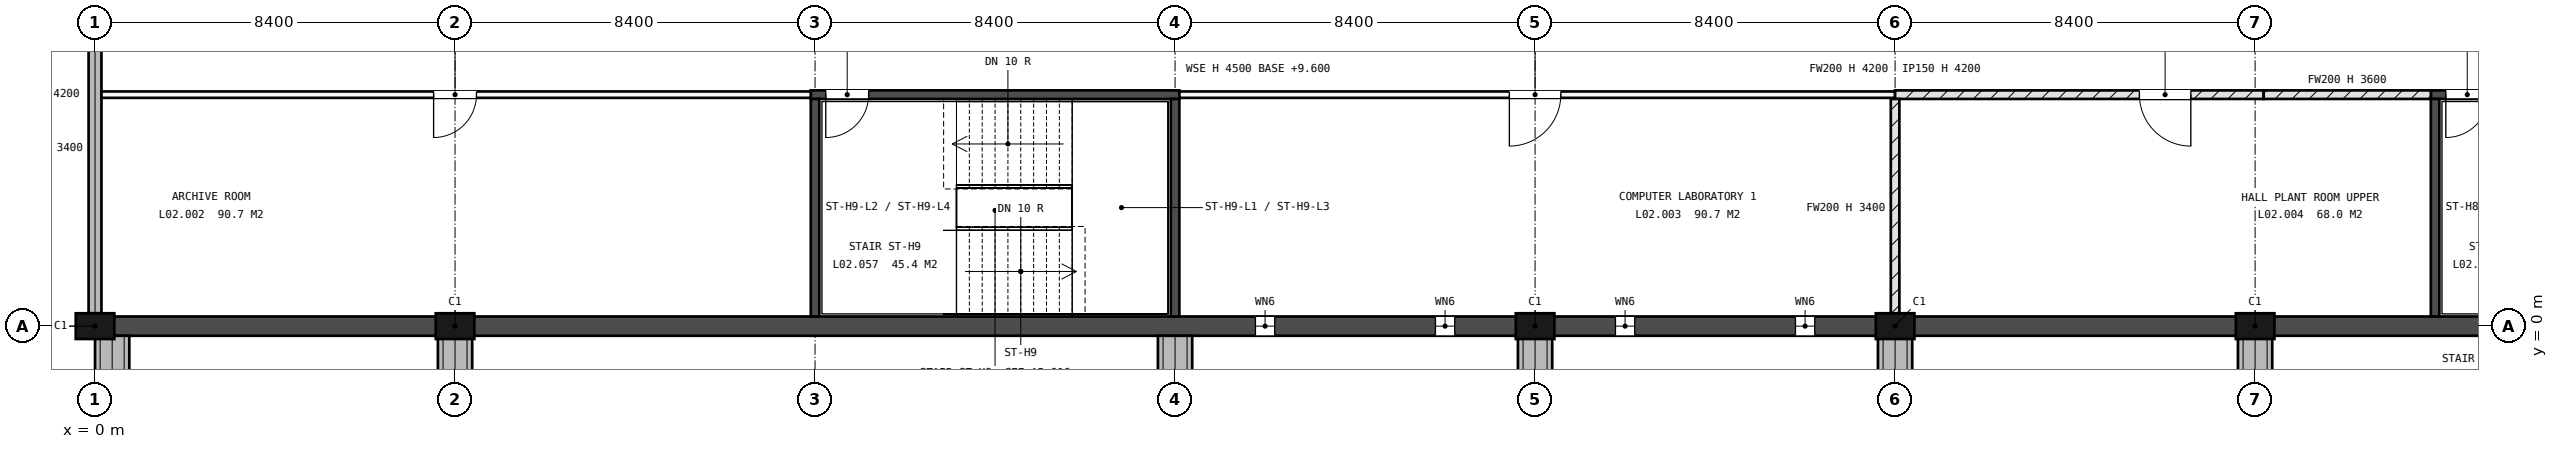
"""IFC4 building model, lengths in metres.
Left out: names, types, materials, properties, quantities, classifications, styles, units other than length and angle.
Written with IfcOpenShell. Run it as: python <this file> out.ifc"""

import sys

from ifc_helpers import new_model, si_unit, direction, frame, frame_2d, origin, origin_2d, place, context, subcontext, project, spatial, rectangle, extrude, element, fill, save


model = new_model("IFC4")
c1 = context("Model", 3, precision=1e-05, world=origin(), true_north=direction((0.0, 1.0)))
c2 = subcontext(c1, "Body", "Model", "MODEL_VIEW")
j1 = project(units=[si_unit("LENGTHUNIT", "METRE"), si_unit("PLANEANGLEUNIT", "RADIAN")], contexts=[c1])
p1 = place(None, origin())
s1 = spatial("IfcSite", under=j1, at=p1, CompositionType="ELEMENT")
p2 = place(p1, origin())
s2 = spatial("IfcBuilding", under=s1, at=p2, CompositionType="ELEMENT")
p3 = place(p2, frame((0.0, 0.0, 9.9)))
s3 = spatial("IfcBuildingStorey", under=s2, at=p3, CompositionType="ELEMENT", Elevation=9.9)
for number, where, z_axis, x_axis in (
    (1, (0.0, 0.0, -0.25), (0.0, 0.0, 1.0), (1.0, 0.0, 0.0)),
    (2, (8.4, 0.0, -0.25), (0.0, 0.0, 1.0), (1.0, 0.0, 0.0)),
    (3, (33.6, 0.0, -0.25), (0.0, 0.0, 1.0), (1.0, 0.0, 0.0)),
    (4, (42.0, 0.0, -0.25), (0.0, 0.0, 1.0), (1.0, 0.0, 0.0)),
    (5, (50.4, 0.0, -0.25), (0.0, 0.0, 1.0), (1.0, 0.0, 0.0)),
):
    element("IfcColumn", number, at=place(p3, frame(where, z_axis=z_axis, x_axis=x_axis)), inside=s3, PredefinedType="PILASTER", context=c2, shape_type="SweptSolid", body=[
        extrude(rectangle(XDim=0.9, YDim=0.6, at=origin_2d()), origin(), (0.0, 0.0, 1.0), 4.45),
    ])
p4 = place(p3, frame((0.0, 0.0, -0.25), z_axis=(0.0, 0.0, 1.0), x_axis=(1.0, 0.0, 0.0)))
e6 = element("IfcWall", 6, at=p4, inside=s3, PredefinedType="SOLIDWALL", context=c2, shape_type="SweptSolid", body=[
    extrude(rectangle(XDim=168.0, YDim=0.45, at=frame_2d((84.0, 0.0))), origin(), (0.0, 0.0, 1.0), 4.45),
])
p5 = place(p4, frame((27.075, 0.0, 1.45)))
e7 = element("IfcOpeningElement", 7, at=p5, cuts=e6, PredefinedType="OPENING", context=c2, shape_type="SweptSolid", body=[
    extrude(rectangle(XDim=0.45, YDim=2.4, at=frame_2d((0.225, 1.2))), frame((0.0, 0.235, 0.0), z_axis=(0.0, -1.0, 0.0), x_axis=(1.0, 0.0, 0.0)), (0.0, 0.0, 1.0), 0.47),
])
p6 = place(p4, frame((31.275, 0.0, 1.45)))
e8 = element("IfcOpeningElement", 8, at=p6, cuts=e6, PredefinedType="OPENING", context=c2, shape_type="SweptSolid", body=[
    extrude(rectangle(XDim=0.45, YDim=2.4, at=frame_2d((0.225, 1.2))), frame((0.0, 0.235, 0.0), z_axis=(0.0, -1.0, 0.0), x_axis=(1.0, 0.0, 0.0)), (0.0, 0.0, 1.0), 0.47),
])
p7 = place(p4, frame((35.475, 0.0, 1.45)))
e9 = element("IfcOpeningElement", 9, at=p7, cuts=e6, PredefinedType="OPENING", context=c2, shape_type="SweptSolid", body=[
    extrude(rectangle(XDim=0.45, YDim=2.4, at=frame_2d((0.225, 1.2))), frame((0.0, 0.235, 0.0), z_axis=(0.0, -1.0, 0.0), x_axis=(1.0, 0.0, 0.0)), (0.0, 0.0, 1.0), 0.47),
])
p8 = place(p4, frame((39.675, 0.0, 1.45)))
e10 = element("IfcOpeningElement", 10, at=p8, cuts=e6, PredefinedType="OPENING", context=c2, shape_type="SweptSolid", body=[
    extrude(rectangle(XDim=0.45, YDim=2.4, at=frame_2d((0.225, 1.2))), frame((0.0, 0.235, 0.0), z_axis=(0.0, -1.0, 0.0), x_axis=(1.0, 0.0, 0.0)), (0.0, 0.0, 1.0), 0.47),
])
p9 = place(p4, frame((94.275, 0.0, 1.45)))
e11 = element("IfcOpeningElement", 11, at=p9, cuts=e6, PredefinedType="OPENING", context=c2, shape_type="SweptSolid", body=[
    extrude(rectangle(XDim=0.45, YDim=2.4, at=frame_2d((0.225, 1.2))), frame((0.0, 0.235, 0.0), z_axis=(0.0, -1.0, 0.0), x_axis=(1.0, 0.0, 0.0)), (0.0, 0.0, 1.0), 0.47),
])
p10 = place(p4, frame((98.475, 0.0, 1.45)))
e12 = element("IfcOpeningElement", 12, at=p10, cuts=e6, PredefinedType="OPENING", context=c2, shape_type="SweptSolid", body=[
    extrude(rectangle(XDim=0.45, YDim=2.4, at=frame_2d((0.225, 1.2))), frame((0.0, 0.235, 0.0), z_axis=(0.0, -1.0, 0.0), x_axis=(1.0, 0.0, 0.0)), (0.0, 0.0, 1.0), 0.47),
])
p11 = place(p4, frame((102.675, 0.0, 1.45)))
e13 = element("IfcOpeningElement", 13, at=p11, cuts=e6, PredefinedType="OPENING", context=c2, shape_type="SweptSolid", body=[
    extrude(rectangle(XDim=0.45, YDim=2.4, at=frame_2d((0.225, 1.2))), frame((0.0, 0.235, 0.0), z_axis=(0.0, -1.0, 0.0), x_axis=(1.0, 0.0, 0.0)), (0.0, 0.0, 1.0), 0.47),
])
p12 = place(p4, frame((106.875, 0.0, 1.45)))
e14 = element("IfcOpeningElement", 14, at=p12, cuts=e6, PredefinedType="OPENING", context=c2, shape_type="SweptSolid", body=[
    extrude(rectangle(XDim=0.45, YDim=2.4, at=frame_2d((0.225, 1.2))), frame((0.0, 0.235, 0.0), z_axis=(0.0, -1.0, 0.0), x_axis=(1.0, 0.0, 0.0)), (0.0, 0.0, 1.0), 0.47),
])
p13 = place(p4, frame((111.075, 0.0, 1.45)))
e15 = element("IfcOpeningElement", 15, at=p13, cuts=e6, PredefinedType="OPENING", context=c2, shape_type="SweptSolid", body=[
    extrude(rectangle(XDim=0.45, YDim=2.4, at=frame_2d((0.225, 1.2))), frame((0.0, 0.235, 0.0), z_axis=(0.0, -1.0, 0.0), x_axis=(1.0, 0.0, 0.0)), (0.0, 0.0, 1.0), 0.47),
])
p14 = place(p4, frame((115.275, 0.0, 1.45)))
e16 = element("IfcOpeningElement", 16, at=p14, cuts=e6, PredefinedType="OPENING", context=c2, shape_type="SweptSolid", body=[
    extrude(rectangle(XDim=0.45, YDim=2.4, at=frame_2d((0.225, 1.2))), frame((0.0, 0.235, 0.0), z_axis=(0.0, -1.0, 0.0), x_axis=(1.0, 0.0, 0.0)), (0.0, 0.0, 1.0), 0.47),
])
p15 = place(p4, frame((127.875, 0.0, 1.45)))
e17 = element("IfcOpeningElement", 17, at=p15, cuts=e6, PredefinedType="OPENING", context=c2, shape_type="SweptSolid", body=[
    extrude(rectangle(XDim=0.45, YDim=2.4, at=frame_2d((0.225, 1.2))), frame((0.0, 0.235, 0.0), z_axis=(0.0, -1.0, 0.0), x_axis=(1.0, 0.0, 0.0)), (0.0, 0.0, 1.0), 0.47),
])
p16 = place(p4, frame((132.075, 0.0, 1.45)))
e18 = element("IfcOpeningElement", 18, at=p16, cuts=e6, PredefinedType="OPENING", context=c2, shape_type="SweptSolid", body=[
    extrude(rectangle(XDim=0.45, YDim=2.4, at=frame_2d((0.225, 1.2))), frame((0.0, 0.235, 0.0), z_axis=(0.0, -1.0, 0.0), x_axis=(1.0, 0.0, 0.0)), (0.0, 0.0, 1.0), 0.47),
])
p17 = place(p4, frame((136.275, 0.0, 1.45)))
e19 = element("IfcOpeningElement", 19, at=p17, cuts=e6, PredefinedType="OPENING", context=c2, shape_type="SweptSolid", body=[
    extrude(rectangle(XDim=0.45, YDim=2.4, at=frame_2d((0.225, 1.2))), frame((0.0, 0.235, 0.0), z_axis=(0.0, -1.0, 0.0), x_axis=(1.0, 0.0, 0.0)), (0.0, 0.0, 1.0), 0.47),
])
p18 = place(p4, frame((140.475, 0.0, 1.45)))
e20 = element("IfcOpeningElement", 20, at=p18, cuts=e6, PredefinedType="OPENING", context=c2, shape_type="SweptSolid", body=[
    extrude(rectangle(XDim=0.45, YDim=2.4, at=frame_2d((0.225, 1.2))), frame((0.0, 0.235, 0.0), z_axis=(0.0, -1.0, 0.0), x_axis=(1.0, 0.0, 0.0)), (0.0, 0.0, 1.0), 0.47),
])
p19 = place(p4, frame((144.675, 0.0, 1.45)))
e21 = element("IfcOpeningElement", 21, at=p19, cuts=e6, PredefinedType="OPENING", context=c2, shape_type="SweptSolid", body=[
    extrude(rectangle(XDim=0.45, YDim=2.4, at=frame_2d((0.225, 1.2))), frame((0.0, 0.235, 0.0), z_axis=(0.0, -1.0, 0.0), x_axis=(1.0, 0.0, 0.0)), (0.0, 0.0, 1.0), 0.47),
])
p20 = place(p4, frame((148.875, 0.0, 1.45)))
e22 = element("IfcOpeningElement", 22, at=p20, cuts=e6, PredefinedType="OPENING", context=c2, shape_type="SweptSolid", body=[
    extrude(rectangle(XDim=0.45, YDim=2.4, at=frame_2d((0.225, 1.2))), frame((0.0, 0.235, 0.0), z_axis=(0.0, -1.0, 0.0), x_axis=(1.0, 0.0, 0.0)), (0.0, 0.0, 1.0), 0.47),
])
p21 = place(p4, frame((153.075, 0.0, 1.45)))
e23 = element("IfcOpeningElement", 23, at=p21, cuts=e6, PredefinedType="OPENING", context=c2, shape_type="SweptSolid", body=[
    extrude(rectangle(XDim=0.45, YDim=2.4, at=frame_2d((0.225, 1.2))), frame((0.0, 0.235, 0.0), z_axis=(0.0, -1.0, 0.0), x_axis=(1.0, 0.0, 0.0)), (0.0, 0.0, 1.0), 0.47),
])
p22 = place(p4, frame((157.275, 0.0, 1.45)))
e24 = element("IfcOpeningElement", 24, at=p22, cuts=e6, PredefinedType="OPENING", context=c2, shape_type="SweptSolid", body=[
    extrude(rectangle(XDim=0.45, YDim=2.4, at=frame_2d((0.225, 1.2))), frame((0.0, 0.235, 0.0), z_axis=(0.0, -1.0, 0.0), x_axis=(1.0, 0.0, 0.0)), (0.0, 0.0, 1.0), 0.47),
])
p23 = place(p3, frame((0.0, 0.3, 0.0), z_axis=(0.0, 0.0, 1.0), x_axis=(0.0, 1.0, 0.0)))
e25 = element("IfcWall", 25, at=p23, inside=s3, PredefinedType="STANDARD", context=c2, shape_type="SweptSolid", body=[
    extrude(rectangle(XDim=7.7, YDim=0.3, at=frame_2d((3.85, 0.0))), origin(), (0.0, 0.0, 1.0), 3.4),
])
for number, where, z_axis, x_axis in (
    (26, (0.4, -0.225, -0.25), (0.0, 0.0, 1.0), (0.0, -1.0, 0.0)),
    (27, (8.4, -0.225, -0.25), (0.0, 0.0, 1.0), (0.0, -1.0, 0.0)),
    (28, (25.2, -0.225, -0.25), (0.0, 0.0, 1.0), (0.0, -1.0, 0.0)),
    (29, (33.6, -0.225, -0.25), (0.0, 0.0, 1.0), (0.0, -1.0, 0.0)),
    (30, (42.0, -0.225, -0.25), (0.0, 0.0, 1.0), (0.0, -1.0, 0.0)),
    (31, (50.4, -0.225, -0.25), (0.0, 0.0, 1.0), (0.0, -1.0, 0.0)),
):
    element("IfcWall", number, at=place(p3, frame(where, z_axis=z_axis, x_axis=x_axis)), inside=s3, PredefinedType="SOLIDWALL", context=c2, shape_type="SweptSolid", body=[
        extrude(rectangle(XDim=0.9, YDim=0.8, at=frame_2d((0.45, 0.0))), origin(), (0.0, 0.0, 1.0), 4.45),
    ])
p24 = place(p3, frame((54.5, 5.4, -0.3), z_axis=(0.0, 0.0, 1.0), x_axis=(1.0, 0.0, 0.0)))
e32 = element("IfcWall", 32, at=p24, inside=s3, PredefinedType="SHEAR", context=c2, shape_type="SweptSolid", body=[
    extrude(rectangle(XDim=8.6, YDim=0.2, at=frame_2d((4.3, 0.0))), origin(), (0.0, 0.0, 1.0), 4.5),
])
p25 = place(p24, frame((0.35, 0.0, 0.3)))
e33 = element("IfcOpeningElement", 33, at=p25, cuts=e32, PredefinedType="OPENING", context=c2, shape_type="SweptSolid", body=[
    extrude(rectangle(XDim=1.0, YDim=2.1, at=frame_2d((0.5, 1.05))), frame((0.0, 0.11, 0.0), z_axis=(0.0, -1.0, 0.0), x_axis=(1.0, 0.0, 0.0)), (0.0, 0.0, 1.0), 0.22),
])
p26 = place(p3, frame((54.6, 0.225, -0.3), z_axis=(0.0, 0.0, 1.0), x_axis=(0.0, 1.0, 0.0)))
e34 = element("IfcWall", 34, at=p26, inside=s3, PredefinedType="SHEAR", context=c2, shape_type="SweptSolid", body=[
    extrude(rectangle(XDim=5.075, YDim=0.2, at=frame_2d((2.538, 0.0))), origin(), (0.0, 0.0, 1.0), 4.5),
])
p27 = place(p3, frame((16.7, 5.4, -0.3), z_axis=(0.0, 0.0, 1.0), x_axis=(1.0, 0.0, 0.0)))
e35 = element("IfcWall", 35, at=p27, inside=s3, PredefinedType="SHEAR", context=c2, shape_type="SweptSolid", body=[
    extrude(rectangle(XDim=8.6, YDim=0.2, at=frame_2d((4.3, 0.0))), origin(), (0.0, 0.0, 1.0), 4.5),
])
p28 = place(p27, frame((0.35, 0.0, 0.3)))
e36 = element("IfcOpeningElement", 36, at=p28, cuts=e35, PredefinedType="OPENING", context=c2, shape_type="SweptSolid", body=[
    extrude(rectangle(XDim=1.0, YDim=2.1, at=frame_2d((0.5, 1.05))), frame((0.0, 0.11, 0.0), z_axis=(0.0, -1.0, 0.0), x_axis=(1.0, 0.0, 0.0)), (0.0, 0.0, 1.0), 0.22),
])
for number, where, z_axis, x_axis in (
    (37, (16.8, 0.225, -0.3), (0.0, 0.0, 1.0), (0.0, 1.0, 0.0)),
    (38, (25.2, 0.225, -0.3), (0.0, 0.0, 1.0), (0.0, 1.0, 0.0)),
):
    element("IfcWall", number, at=place(p3, frame(where, z_axis=z_axis, x_axis=x_axis)), inside=s3, PredefinedType="SHEAR", context=c2, shape_type="SweptSolid", body=[
        extrude(rectangle(XDim=5.075, YDim=0.2, at=frame_2d((2.538, 0.0))), origin(), (0.0, 0.0, 1.0), 4.5),
    ])
p29 = place(p3, frame((0.15, 5.4, 0.0), z_axis=(0.0, 0.0, 1.0), x_axis=(1.0, 0.0, 0.0)))
e39 = element("IfcWall", 39, at=p29, inside=s3, PredefinedType="PARTITIONING", context=c2, shape_type="SweptSolid", body=[
    extrude(rectangle(XDim=16.55, YDim=0.15, at=frame_2d((8.275, 0.0))), origin(), (0.0, 0.0, 1.0), 4.2),
])
p30 = place(p29, frame((7.75, 0.0, 0.0)))
e40 = element("IfcOpeningElement", 40, at=p30, cuts=e39, PredefinedType="OPENING", context=c2, shape_type="SweptSolid", body=[
    extrude(rectangle(XDim=1.0, YDim=2.1, at=frame_2d((0.5, 1.05))), frame((0.0, 0.085, 0.0), z_axis=(0.0, -1.0, 0.0), x_axis=(1.0, 0.0, 0.0)), (0.0, 0.0, 1.0), 0.17),
])
p31 = place(p3, frame((25.3, 5.4, 0.0), z_axis=(0.0, 0.0, 1.0), x_axis=(1.0, 0.0, 0.0)))
e41 = element("IfcWall", 41, at=p31, inside=s3, PredefinedType="PARTITIONING", context=c2, shape_type="SweptSolid", body=[
    extrude(rectangle(XDim=16.7, YDim=0.15, at=frame_2d((8.35, 0.0))), origin(), (0.0, 0.0, 1.0), 4.2),
])
p32 = place(p31, frame((7.7, 0.0, 0.0)))
e42 = element("IfcOpeningElement", 42, at=p32, cuts=e41, PredefinedType="OPENING", context=c2, shape_type="SweptSolid", body=[
    extrude(rectangle(XDim=1.2, YDim=2.1, at=frame_2d((0.6, 1.05))), frame((0.0, 0.085, 0.0), z_axis=(0.0, -1.0, 0.0), x_axis=(1.0, 0.0, 0.0)), (0.0, 0.0, 1.0), 0.17),
])
p33 = place(p3, frame((42.0, 5.4, 0.0), z_axis=(0.0, 0.0, 1.0), x_axis=(1.0, 0.0, 0.0)))
e43 = element("IfcWall", 43, at=p33, inside=s3, PredefinedType="SOLIDWALL", context=c2, shape_type="SweptSolid", body=[
    extrude(rectangle(XDim=8.6, YDim=0.2, at=frame_2d((4.3, 0.0))), origin(), (0.0, 0.0, 1.0), 4.2),
])
p34 = place(p33, frame((5.7, 0.0, 0.0)))
e44 = element("IfcOpeningElement", 44, at=p34, cuts=e43, PredefinedType="OPENING", context=c2, shape_type="SweptSolid", body=[
    extrude(rectangle(XDim=1.2, YDim=2.4, at=frame_2d((0.6, 1.2))), frame((0.0, 0.11, 0.0), z_axis=(0.0, -1.0, 0.0), x_axis=(1.0, 0.0, 0.0)), (0.0, 0.0, 1.0), 0.22),
])
p35 = place(p3, frame((50.6, 5.4, 0.0), z_axis=(0.0, 0.0, 1.0), x_axis=(1.0, 0.0, 0.0)))
e45 = element("IfcWall", 45, at=p35, inside=s3, PredefinedType="SOLIDWALL", context=c2, shape_type="SweptSolid", body=[
    extrude(rectangle(XDim=3.9, YDim=0.2, at=frame_2d((1.95, 0.0))), origin(), (0.0, 0.0, 1.0), 3.6),
])
p36 = place(p3, frame((42.0, 0.225, 0.0), z_axis=(0.0, 0.0, 1.0), x_axis=(0.0, 1.0, 0.0)))
e46 = element("IfcWall", 46, at=p36, inside=s3, PredefinedType="SOLIDWALL", context=c2, shape_type="SweptSolid", body=[
    extrude(rectangle(XDim=5.075, YDim=0.2, at=frame_2d((2.538, 0.0))), origin(), (0.0, 0.0, 1.0), 3.4),
])
p37 = place(p5, origin())
e47 = element("IfcWindow", 47, at=p37, inside=s3, PartitioningType="SINGLE_PANEL", PredefinedType="WINDOW", context=c2, shape_type="SweptSolid", body=[
    extrude(rectangle(XDim=0.45, YDim=2.4, at=frame_2d((0.225, 1.2))), frame((0.0, 0.03, 0.0), z_axis=(0.0, -1.0, 0.0), x_axis=(1.0, 0.0, 0.0)), (0.0, 0.0, 1.0), 0.06),
])
fill(e7, e47)
p38 = place(p6, origin())
e48 = element("IfcWindow", 48, at=p38, inside=s3, PartitioningType="SINGLE_PANEL", PredefinedType="WINDOW", context=c2, shape_type="SweptSolid", body=[
    extrude(rectangle(XDim=0.45, YDim=2.4, at=frame_2d((0.225, 1.2))), frame((0.0, 0.03, 0.0), z_axis=(0.0, -1.0, 0.0), x_axis=(1.0, 0.0, 0.0)), (0.0, 0.0, 1.0), 0.06),
])
fill(e8, e48)
p39 = place(p7, origin())
e49 = element("IfcWindow", 49, at=p39, inside=s3, PartitioningType="SINGLE_PANEL", PredefinedType="WINDOW", context=c2, shape_type="SweptSolid", body=[
    extrude(rectangle(XDim=0.45, YDim=2.4, at=frame_2d((0.225, 1.2))), frame((0.0, 0.03, 0.0), z_axis=(0.0, -1.0, 0.0), x_axis=(1.0, 0.0, 0.0)), (0.0, 0.0, 1.0), 0.06),
])
fill(e9, e49)
p40 = place(p8, origin())
e50 = element("IfcWindow", 50, at=p40, inside=s3, PartitioningType="SINGLE_PANEL", PredefinedType="WINDOW", context=c2, shape_type="SweptSolid", body=[
    extrude(rectangle(XDim=0.45, YDim=2.4, at=frame_2d((0.225, 1.2))), frame((0.0, 0.03, 0.0), z_axis=(0.0, -1.0, 0.0), x_axis=(1.0, 0.0, 0.0)), (0.0, 0.0, 1.0), 0.06),
])
fill(e10, e50)
p41 = place(p25, origin())
e51 = element("IfcDoor", 51, at=p41, inside=s3, OperationType="SINGLE_SWING_LEFT", PredefinedType="DOOR", context=c2, shape_type="SweptSolid", body=[
    extrude(rectangle(XDim=1.0, YDim=2.1, at=frame_2d((0.5, 1.05))), frame((0.0, 0.025, 0.0), z_axis=(0.0, -1.0, 0.0), x_axis=(1.0, 0.0, 0.0)), (0.0, 0.0, 1.0), 0.05),
])
fill(e33, e51)
p42 = place(p28, origin())
e52 = element("IfcDoor", 52, at=p42, inside=s3, OperationType="SINGLE_SWING_LEFT", PredefinedType="DOOR", context=c2, shape_type="SweptSolid", body=[
    extrude(rectangle(XDim=1.0, YDim=2.1, at=frame_2d((0.5, 1.05))), frame((0.0, 0.025, 0.0), z_axis=(0.0, -1.0, 0.0), x_axis=(1.0, 0.0, 0.0)), (0.0, 0.0, 1.0), 0.05),
])
fill(e36, e52)
p43 = place(p30, origin())
e53 = element("IfcDoor", 53, at=p43, inside=s3, OperationType="SINGLE_SWING_LEFT", PredefinedType="DOOR", context=c2, shape_type="SweptSolid", body=[
    extrude(rectangle(XDim=1.0, YDim=2.1, at=frame_2d((0.5, 1.05))), frame((0.0, 0.025, 0.0), z_axis=(0.0, -1.0, 0.0), x_axis=(1.0, 0.0, 0.0)), (0.0, 0.0, 1.0), 0.05),
])
fill(e40, e53)
p44 = place(p32, origin())
e54 = element("IfcDoor", 54, at=p44, inside=s3, OperationType="SINGLE_SWING_LEFT", PredefinedType="DOOR", context=c2, shape_type="SweptSolid", body=[
    extrude(rectangle(XDim=1.2, YDim=2.1, at=frame_2d((0.6, 1.05))), frame((0.0, 0.025, 0.0), z_axis=(0.0, -1.0, 0.0), x_axis=(1.0, 0.0, 0.0)), (0.0, 0.0, 1.0), 0.05),
])
fill(e42, e54)
p45 = place(p34, origin())
e55 = element("IfcDoor", 55, at=p45, inside=s3, OperationType="SINGLE_SWING_RIGHT", PredefinedType="DOOR", context=c2, shape_type="SweptSolid", body=[
    extrude(rectangle(XDim=1.2, YDim=2.4, at=frame_2d((0.6, 1.2))), frame((0.0, 0.025, 0.0), z_axis=(0.0, -1.0, 0.0), x_axis=(1.0, 0.0, 0.0)), (0.0, 0.0, 1.0), 0.05),
])
fill(e44, e55)
save(model, sys.argv[1])
